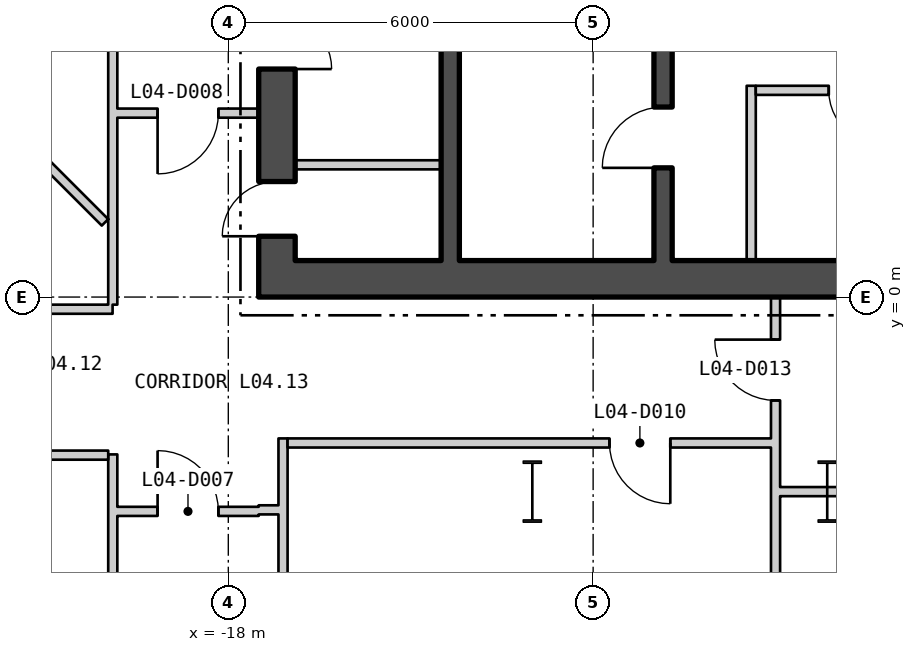
"""IFC4 building model, lengths in metres.
Left out: names, types, materials, properties, quantities, classifications, styles, units other than length and angle.
Written with IfcOpenShell. Run it as: python <this file> out.ifc"""

import sys

from ifc_helpers import new_model, si_unit, direction, frame, frame_2d, origin, origin_2d, place, context, subcontext, project, spatial, rectangle, i_section, extrude, element, fill, save


model = new_model("IFC4")
c1 = context("Model", 3, precision=1e-05, world=origin(), true_north=direction((0.0, 1.0)))
c2 = subcontext(c1, "Body", "Model", "MODEL_VIEW")
j1 = project(units=[si_unit("LENGTHUNIT", "METRE"), si_unit("PLANEANGLEUNIT", "RADIAN")], contexts=[c1])
p1 = place(None, origin())
s1 = spatial("IfcSite", under=j1, at=p1, CompositionType="ELEMENT")
p2 = place(p1, origin())
s2 = spatial("IfcBuilding", under=s1, at=p2, CompositionType="ELEMENT")
p3 = place(p2, frame((0.0, 0.0, 23.7)))
s3 = spatial("IfcBuildingStorey", under=s2, at=p3, CompositionType="ELEMENT", Elevation=23.7)
for number, where, z_axis, x_axis in (
    (1, (-8.15, -3.2, 0.0), (0.0, 0.0, 1.0), (1.0, 0.0, 0.0)),
    (2, (-13.0, -3.2, 0.0), (0.0, 0.0, 1.0), (1.0, 0.0, 0.0)),
):
    element("IfcColumn", number, at=place(p3, frame(where, z_axis=z_axis, x_axis=x_axis)), inside=s3, PredefinedType="COLUMN", context=c2, shape_type="SweptSolid", body=[
        extrude(i_section(OverallWidth=0.302, OverallDepth=1.008, WebThickness=0.021, FlangeThickness=0.04, at=origin_2d()), origin(), (0.0, 0.0, 1.0), 5.1),
    ])
p4 = place(p3, frame((-17.5, 0.3, 0.0), z_axis=(0.0, 0.0, 1.0), x_axis=(1.0, 0.0, 0.0)))
e3 = element("IfcWall", 3, at=p4, inside=s3, PredefinedType="SHEAR", context=c2, shape_type="SweptSolid", body=[
    extrude(rectangle(XDim=35.0, YDim=0.6, at=frame_2d((17.5, 0.0))), origin(), (0.0, 0.0, 1.0), 4.85),
])
p5 = place(p4, frame((12.0, 0.0, 0.0)))
e4 = element("IfcOpeningElement", 4, at=p5, cuts=e3, PredefinedType="OPENING", context=c2, shape_type="SweptSolid", body=[
    extrude(rectangle(XDim=1.8, YDim=2.4, at=frame_2d((0.9, 1.2))), frame((0.0, 0.31, 0.0), z_axis=(0.0, -1.0, 0.0), x_axis=(1.0, 0.0, 0.0)), (0.0, 0.0, 1.0), 0.62),
])
p6 = place(p4, frame((22.0, 0.0, 0.0)))
e5 = element("IfcOpeningElement", 5, at=p6, cuts=e3, PredefinedType="OPENING", context=c2, shape_type="SweptSolid", body=[
    extrude(rectangle(XDim=1.8, YDim=2.4, at=frame_2d((0.9, 1.2))), frame((0.0, 0.31, 0.0), z_axis=(0.0, -1.0, 0.0), x_axis=(1.0, 0.0, 0.0)), (0.0, 0.0, 1.0), 0.62),
])
p7 = place(p3, frame((-17.2, 0.6, 0.0), z_axis=(0.0, 0.0, 1.0), x_axis=(0.0, 1.0, 0.0)))
e6 = element("IfcWall", 6, at=p7, inside=s3, PredefinedType="SHEAR", context=c2, shape_type="SweptSolid", body=[
    extrude(rectangle(XDim=16.8, YDim=0.6, at=frame_2d((8.4, 0.0))), origin(), (0.0, 0.0, 1.0), 4.85),
])
p8 = place(p7, frame((5.7, 0.0, 0.0)))
e7 = element("IfcOpeningElement", 7, at=p8, cuts=e6, PredefinedType="OPENING", context=c2, shape_type="SweptSolid", body=[
    extrude(rectangle(XDim=1.5, YDim=2.1, at=frame_2d((0.75, 1.05))), frame((0.0, 0.31, 0.0), z_axis=(0.0, -1.0, 0.0), x_axis=(1.0, 0.0, 0.0)), (0.0, 0.0, 1.0), 0.62),
])
p9 = place(p7, frame((0.4, 0.0, 0.0)))
e8 = element("IfcOpeningElement", 8, at=p9, cuts=e6, PredefinedType="OPENING", context=c2, shape_type="SweptSolid", body=[
    extrude(rectangle(XDim=0.9, YDim=2.1, at=frame_2d((0.45, 1.05))), frame((0.0, 0.31, 0.0), z_axis=(0.0, -1.0, 0.0), x_axis=(1.0, 0.0, 0.0)), (0.0, 0.0, 1.0), 0.62),
])
p10 = place(p7, frame((3.15, 0.0, 0.0)))
e9 = element("IfcOpeningElement", 9, at=p10, cuts=e6, PredefinedType="OPENING", context=c2, shape_type="SweptSolid", body=[
    extrude(rectangle(XDim=0.9, YDim=2.1, at=frame_2d((0.45, 1.05))), frame((0.0, 0.31, 0.0), z_axis=(0.0, -1.0, 0.0), x_axis=(1.0, 0.0, 0.0)), (0.0, 0.0, 1.0), 0.62),
])
p11 = place(p7, frame((7.816, 0.0, 0.0)))
e10 = element("IfcOpeningElement", 10, at=p11, cuts=e6, PredefinedType="OPENING", context=c2, shape_type="SweptSolid", body=[
    extrude(rectangle(XDim=1.0, YDim=2.1, at=frame_2d((0.5, 1.05))), frame((0.0, 0.31, 0.0), z_axis=(0.0, -1.0, 0.0), x_axis=(1.0, 0.0, 0.0)), (0.0, 0.0, 1.0), 0.62),
])
p12 = place(p7, frame((12.666, 0.0, 0.0)))
e11 = element("IfcOpeningElement", 11, at=p12, cuts=e6, PredefinedType="OPENING", context=c2, shape_type="SweptSolid", body=[
    extrude(rectangle(XDim=0.9, YDim=2.1, at=frame_2d((0.45, 1.05))), frame((0.0, 0.31, 0.0), z_axis=(0.0, -1.0, 0.0), x_axis=(1.0, 0.0, 0.0)), (0.0, 0.0, 1.0), 0.62),
])
p13 = place(p3, frame((-10.85, 0.6, 0.0), z_axis=(0.0, 0.0, 1.0), x_axis=(0.0, 1.0, 0.0)))
e12 = element("IfcWall", 12, at=p13, inside=s3, PredefinedType="SHEAR", context=c2, shape_type="SweptSolid", body=[
    extrude(rectangle(XDim=16.8, YDim=0.3, at=frame_2d((8.4, 0.0))), origin(), (0.0, 0.0, 1.0), 4.85),
])
p14 = place(p13, frame((5.075, 0.0, 0.0)))
e13 = element("IfcOpeningElement", 13, at=p14, cuts=e12, PredefinedType="OPENING", context=c2, shape_type="SweptSolid", body=[
    extrude(rectangle(XDim=1.25, YDim=2.1, at=frame_2d((0.625, 1.05))), frame((0.0, 0.16, 0.0), z_axis=(0.0, -1.0, 0.0), x_axis=(1.0, 0.0, 0.0)), (0.0, 0.0, 1.0), 0.32),
])
p15 = place(p13, frame((1.525, 0.0, 0.0)))
e14 = element("IfcOpeningElement", 14, at=p15, cuts=e12, PredefinedType="OPENING", context=c2, shape_type="SweptSolid", body=[
    extrude(rectangle(XDim=1.0, YDim=2.1, at=frame_2d((0.5, 1.05))), frame((0.0, 0.16, 0.0), z_axis=(0.0, -1.0, 0.0), x_axis=(1.0, 0.0, 0.0)), (0.0, 0.0, 1.0), 0.32),
])
p16 = place(p3, frame((-14.35, 0.6, 0.0), z_axis=(0.0, 0.0, 1.0), x_axis=(0.0, 1.0, 0.0)))
e15 = element("IfcWall", 15, at=p16, inside=s3, PredefinedType="SHEAR", context=c2, shape_type="SweptSolid", body=[
    extrude(rectangle(XDim=16.8, YDim=0.3, at=frame_2d((8.4, 0.0))), origin(), (0.0, 0.0, 1.0), 4.85),
])
p17 = place(p16, frame((5.7, 0.0, 0.0)))
e16 = element("IfcOpeningElement", 16, at=p17, cuts=e15, PredefinedType="OPENING", context=c2, shape_type="SweptSolid", body=[
    extrude(rectangle(XDim=1.5, YDim=2.1, at=frame_2d((0.75, 1.05))), frame((0.0, 0.16, 0.0), z_axis=(0.0, -1.0, 0.0), x_axis=(1.0, 0.0, 0.0)), (0.0, 0.0, 1.0), 0.32),
])
p18 = place(p3, frame((-16.9, 2.175, 0.0), z_axis=(0.0, 0.0, 1.0), x_axis=(1.0, 0.0, 0.0)))
e17 = element("IfcWall", 17, at=p18, inside=s3, PredefinedType="PARTITIONING", context=c2, shape_type="SweptSolid", body=[
    extrude(rectangle(XDim=2.4, YDim=0.15, at=frame_2d((1.2, 0.0))), origin(), (0.0, 0.0, 1.0), 4.85),
])
p19 = place(p3, frame((-9.4, 0.6, 0.0), z_axis=(0.0, 0.0, 1.0), x_axis=(0.0, 1.0, 0.0)))
e18 = element("IfcWall", 18, at=p19, inside=s3, PredefinedType="PARTITIONING", context=c2, shape_type="SweptSolid", body=[
    extrude(rectangle(XDim=2.875, YDim=0.15, at=frame_2d((1.438, 0.0))), origin(), (0.0, 0.0, 1.0), 4.85),
])
p20 = place(p3, frame((-9.325, 3.4, 0.0), z_axis=(0.0, 0.0, 1.0), x_axis=(1.0, 0.0, 0.0)))
e19 = element("IfcWall", 19, at=p20, inside=s3, PredefinedType="PARTITIONING", context=c2, shape_type="SweptSolid", body=[
    extrude(rectangle(XDim=3.3, YDim=0.15, at=frame_2d((1.65, 0.0))), origin(), (0.0, 0.0, 1.0), 4.85),
])
p21 = place(p20, frame((1.2, 0.0, 0.0)))
e20 = element("IfcOpeningElement", 20, at=p21, cuts=e19, PredefinedType="OPENING", context=c2, shape_type="SweptSolid", body=[
    extrude(rectangle(XDim=0.9, YDim=2.1, at=frame_2d((0.45, 1.05))), frame((0.0, 0.085, 0.0), z_axis=(0.0, -1.0, 0.0), x_axis=(1.0, 0.0, 0.0)), (0.0, 0.0, 1.0), 0.17),
])
p22 = place(p3, frame((-26.75, -0.2, 0.0), z_axis=(0.0, 0.0, 1.0), x_axis=(1.0, 0.0, 0.0)))
e21 = element("IfcWall", 21, at=p22, inside=s3, PredefinedType="PARTITIONING", context=c2, shape_type="SweptSolid", body=[
    extrude(rectangle(XDim=6.847, YDim=0.15, at=frame_2d((3.424, 0.0))), origin(), (0.0, 0.0, 1.0), 4.85),
])
p23 = place(p22, frame((3.932, 0.0, 0.0)))
e22 = element("IfcOpeningElement", 22, at=p23, cuts=e21, PredefinedType="OPENING", context=c2, shape_type="SweptSolid", body=[
    extrude(rectangle(XDim=1.0, YDim=2.1, at=frame_2d((0.5, 1.05))), frame((0.0, 0.085, 0.0), z_axis=(0.0, -1.0, 0.0), x_axis=(1.0, 0.0, 0.0)), (0.0, 0.0, 1.0), 0.17),
])
p24 = place(p3, frame((-25.392, 6.592, 0.0), z_axis=(0.0, 0.0, 1.0), x_axis=(0.707106781187, -0.707106781187, 0.0)))
e23 = element("IfcWall", 23, at=p24, inside=s3, PredefinedType="PARTITIONING", context=c2, shape_type="SweptSolid", body=[
    extrude(rectangle(XDim=7.586, YDim=0.15, at=frame_2d((3.793, 0.0))), origin(), (0.0, 0.0, 1.0), 4.85),
])
p25 = place(p3, frame((-23.65, -2.6, 0.0), z_axis=(0.0, 0.0, 1.0), x_axis=(1.0, 0.0, 0.0)))
e24 = element("IfcWall", 24, at=p25, inside=s3, PredefinedType="PARTITIONING", context=c2, shape_type="SweptSolid", body=[
    extrude(rectangle(XDim=3.675, YDim=0.15, at=frame_2d((1.837, 0.0))), origin(), (0.0, 0.0, 1.0), 4.85),
])
p26 = place(p25, frame((1.312, 0.0, 0.0)))
e25 = element("IfcOpeningElement", 25, at=p26, cuts=e24, PredefinedType="OPENING", context=c2, shape_type="SweptSolid", body=[
    extrude(rectangle(XDim=1.0, YDim=2.1, at=frame_2d((0.5, 1.05))), frame((0.0, 0.085, 0.0), z_axis=(0.0, -1.0, 0.0), x_axis=(1.0, 0.0, 0.0)), (0.0, 0.0, 1.0), 0.17),
])
p27 = place(p3, frame((-19.9, -23.775, 0.0), z_axis=(0.0, 0.0, 1.0), x_axis=(0.0, 1.0, 0.0)))
e26 = element("IfcWall", 26, at=p27, inside=s3, PredefinedType="PARTITIONING", context=c2, shape_type="SweptSolid", body=[
    extrude(rectangle(XDim=21.187, YDim=0.15, at=frame_2d((10.594, 0.0))), origin(), (0.0, 0.0, 1.0), 4.85),
])
p28 = place(p27, frame((3.548, 0.0, 0.0)))
e27 = element("IfcOpeningElement", 27, at=p28, cuts=e26, PredefinedType="OPENING", context=c2, shape_type="SweptSolid", body=[
    extrude(rectangle(XDim=1.8, YDim=2.1, at=frame_2d((0.9, 1.05))), frame((0.0, 0.085, 0.0), z_axis=(0.0, -1.0, 0.0), x_axis=(1.0, 0.0, 0.0)), (0.0, 0.0, 1.0), 0.17),
])
p29 = place(p27, frame((12.399, 0.0, 0.0)))
e28 = element("IfcOpeningElement", 28, at=p29, cuts=e26, PredefinedType="OPENING", context=c2, shape_type="SweptSolid", body=[
    extrude(rectangle(XDim=1.0, YDim=2.1, at=frame_2d((0.5, 1.05))), frame((0.0, 0.085, 0.0), z_axis=(0.0, -1.0, 0.0), x_axis=(1.0, 0.0, 0.0)), (0.0, 0.0, 1.0), 0.17),
])
p30 = place(p3, frame((-19.9, -0.125, 0.0), z_axis=(0.0, 0.0, 1.0), x_axis=(0.0, 1.0, 0.0)))
e29 = element("IfcWall", 29, at=p30, inside=s3, PredefinedType="PARTITIONING", context=c2, shape_type="SweptSolid", body=[
    extrude(rectangle(XDim=1.15, YDim=0.15, at=frame_2d((0.575, 0.0))), origin(), (0.0, 0.0, 1.0), 4.85),
])
p31 = place(p3, frame((-19.9, 1.025, 0.0), z_axis=(0.0, 0.0, 1.0), x_axis=(0.0, 1.0, 0.0)))
e30 = element("IfcWall", 30, at=p31, inside=s3, PredefinedType="PARTITIONING", context=c2, shape_type="SweptSolid", body=[
    extrude(rectangle(XDim=16.9, YDim=0.15, at=frame_2d((8.45, 0.0))), origin(), (0.0, 0.0, 1.0), 4.85),
])
p32 = place(p31, frame((8.244, 0.0, 0.0)))
e31 = element("IfcOpeningElement", 31, at=p32, cuts=e30, PredefinedType="OPENING", context=c2, shape_type="SweptSolid", body=[
    extrude(rectangle(XDim=1.8, YDim=2.1, at=frame_2d((0.9, 1.05))), frame((0.0, 0.085, 0.0), z_axis=(0.0, -1.0, 0.0), x_axis=(1.0, 0.0, 0.0)), (0.0, 0.0, 1.0), 0.17),
])
p33 = place(p3, frame((-19.825, -3.525, 0.0), z_axis=(0.0, 0.0, 1.0), x_axis=(1.0, 0.0, 0.0)))
e32 = element("IfcWall", 32, at=p33, inside=s3, PredefinedType="PARTITIONING", context=c2, shape_type="SweptSolid", body=[
    extrude(rectangle(XDim=2.325, YDim=0.15, at=frame_2d((1.163, 0.0))), origin(), (0.0, 0.0, 1.0), 4.85),
])
p34 = place(p33, frame((0.662, 0.0, 0.0)))
e33 = element("IfcOpeningElement", 33, at=p34, cuts=e32, PredefinedType="OPENING", context=c2, shape_type="SweptSolid", body=[
    extrude(rectangle(XDim=1.0, YDim=2.1, at=frame_2d((0.5, 1.05))), frame((0.0, 0.085, 0.0), z_axis=(0.0, -1.0, 0.0), x_axis=(1.0, 0.0, 0.0)), (0.0, 0.0, 1.0), 0.17),
])
p35 = place(p3, frame((-19.825, 3.025, 0.0), z_axis=(0.0, 0.0, 1.0), x_axis=(1.0, 0.0, 0.0)))
e34 = element("IfcWall", 34, at=p35, inside=s3, PredefinedType="PARTITIONING", context=c2, shape_type="SweptSolid", body=[
    extrude(rectangle(XDim=2.325, YDim=0.15, at=frame_2d((1.163, 0.0))), origin(), (0.0, 0.0, 1.0), 4.3),
])
p36 = place(p35, frame((0.662, 0.0, 0.0)))
e35 = element("IfcOpeningElement", 35, at=p36, cuts=e34, PredefinedType="OPENING", context=c2, shape_type="SweptSolid", body=[
    extrude(rectangle(XDim=1.0, YDim=2.1, at=frame_2d((0.5, 1.05))), frame((0.0, 0.085, 0.0), z_axis=(0.0, -1.0, 0.0), x_axis=(1.0, 0.0, 0.0)), (0.0, 0.0, 1.0), 0.17),
])
p37 = place(p3, frame((-17.5, -3.5, 0.0), z_axis=(0.0, 0.0, 1.0), x_axis=(1.0, 0.0, 0.0)))
e36 = element("IfcWall", 36, at=p37, inside=s3, PredefinedType="PARTITIONING", context=c2, shape_type="SweptSolid", body=[
    extrude(rectangle(XDim=0.325, YDim=0.15, at=frame_2d((0.163, 0.0))), origin(), (0.0, 0.0, 1.0), 4.85),
])
p38 = place(p3, frame((-17.1, -21.375, 0.0), z_axis=(0.0, 0.0, 1.0), x_axis=(0.0, 1.0, 0.0)))
e37 = element("IfcWall", 37, at=p38, inside=s3, PredefinedType="PARTITIONING", context=c2, shape_type="SweptSolid", body=[
    extrude(rectangle(XDim=19.05, YDim=0.15, at=frame_2d((9.525, 0.0))), origin(), (0.0, 0.0, 1.0), 4.85),
])
p39 = place(p3, frame((-17.025, -2.4, 0.0), z_axis=(0.0, 0.0, 1.0), x_axis=(1.0, 0.0, 0.0)))
e38 = element("IfcWall", 38, at=p39, inside=s3, PredefinedType="PARTITIONING", context=c2, shape_type="SweptSolid", body=[
    extrude(rectangle(XDim=7.95, YDim=0.15, at=frame_2d((3.975, 0.0))), origin(), (0.0, 0.0, 1.0), 4.85),
])
p40 = place(p39, frame((5.294, 0.0, 0.0)))
e39 = element("IfcOpeningElement", 39, at=p40, cuts=e38, PredefinedType="OPENING", context=c2, shape_type="SweptSolid", body=[
    extrude(rectangle(XDim=1.0, YDim=2.1, at=frame_2d((0.5, 1.05))), frame((0.0, 0.085, 0.0), z_axis=(0.0, -1.0, 0.0), x_axis=(1.0, 0.0, 0.0)), (0.0, 0.0, 1.0), 0.17),
])
p41 = place(p3, frame((-9.0, -13.675, 0.0), z_axis=(0.0, 0.0, 1.0), x_axis=(0.0, 1.0, 0.0)))
e40 = element("IfcWall", 40, at=p41, inside=s3, PredefinedType="PARTITIONING", context=c2, shape_type="SweptSolid", body=[
    extrude(rectangle(XDim=13.675, YDim=0.15, at=frame_2d((6.838, 0.0))), origin(), (0.0, 0.0, 1.0), 4.85),
])
p42 = place(p41, frame((11.975, 0.0, 0.0)))
e41 = element("IfcOpeningElement", 41, at=p42, cuts=e40, PredefinedType="OPENING", context=c2, shape_type="SweptSolid", body=[
    extrude(rectangle(XDim=1.0, YDim=2.1, at=frame_2d((0.5, 1.05))), frame((0.0, 0.085, 0.0), z_axis=(0.0, -1.0, 0.0), x_axis=(1.0, 0.0, 0.0)), (0.0, 0.0, 1.0), 0.17),
])
p43 = place(p3, frame((-8.925, -3.2, 0.0), z_axis=(0.0, 0.0, 1.0), x_axis=(1.0, 0.0, 0.0)))
e42 = element("IfcWall", 42, at=p43, inside=s3, PredefinedType="PARTITIONING", context=c2, shape_type="SweptSolid", body=[
    extrude(rectangle(XDim=0.775, YDim=0.15, at=frame_2d((0.388, 0.0))), origin(), (0.0, 0.0, 1.0), 4.16),
])
p44 = place(p3, frame((-8.15, -3.2, 0.0), z_axis=(0.0, 0.0, 1.0), x_axis=(1.0, 0.0, 0.0)))
e43 = element("IfcWall", 43, at=p44, inside=s3, PredefinedType="PARTITIONING", context=c2, shape_type="SweptSolid", body=[
    extrude(rectangle(XDim=2.225, YDim=0.15, at=frame_2d((1.113, 0.0))), origin(), (0.0, 0.0, 1.0), 3.94),
])
p45 = place(p44, frame((0.513, 0.0, 0.0)))
e44 = element("IfcOpeningElement", 44, at=p45, cuts=e43, PredefinedType="OPENING", context=c2, shape_type="SweptSolid", body=[
    extrude(rectangle(XDim=1.0, YDim=2.1, at=frame_2d((0.5, 1.05))), frame((0.0, 0.085, 0.0), z_axis=(0.0, -1.0, 0.0), x_axis=(1.0, 0.0, 0.0)), (0.0, 0.0, 1.0), 0.17),
])
p46 = place(p15, origin())
e45 = element("IfcDoor", 45, at=p46, inside=s3, OperationType="SINGLE_SWING_RIGHT", PredefinedType="DOOR", context=c2, shape_type="SweptSolid", body=[
    extrude(rectangle(XDim=1.0, YDim=2.1, at=frame_2d((0.5, 1.05))), frame((0.0, 0.025, 0.0), z_axis=(0.0, -1.0, 0.0), x_axis=(1.0, 0.0, 0.0)), (0.0, 0.0, 1.0), 0.05),
])
fill(e14, e45)
p47 = place(p9, origin())
e46 = element("IfcDoor", 46, at=p47, inside=s3, OperationType="SINGLE_SWING_RIGHT", PredefinedType="DOOR", context=c2, shape_type="SweptSolid", body=[
    extrude(rectangle(XDim=0.9, YDim=2.1, at=frame_2d((0.45, 1.05))), frame((0.0, 0.025, 0.0), z_axis=(0.0, -1.0, 0.0), x_axis=(1.0, 0.0, 0.0)), (0.0, 0.0, 1.0), 0.05),
])
fill(e8, e46)
p48 = place(p10, origin())
e47 = element("IfcDoor", 47, at=p48, inside=s3, OperationType="SINGLE_SWING_LEFT", PredefinedType="DOOR", context=c2, shape_type="SweptSolid", body=[
    extrude(rectangle(XDim=0.9, YDim=2.1, at=frame_2d((0.45, 1.05))), frame((0.0, 0.025, 0.0), z_axis=(0.0, -1.0, 0.0), x_axis=(1.0, 0.0, 0.0)), (0.0, 0.0, 1.0), 0.05),
])
fill(e9, e47)
p49 = place(p21, origin())
e48 = element("IfcDoor", 48, at=p49, inside=s3, OperationType="SINGLE_SWING_RIGHT", PredefinedType="DOOR", context=c2, shape_type="SweptSolid", body=[
    extrude(rectangle(XDim=0.9, YDim=2.1, at=frame_2d((0.45, 1.05))), frame((0.0, 0.025, 0.0), z_axis=(0.0, -1.0, 0.0), x_axis=(1.0, 0.0, 0.0)), (0.0, 0.0, 1.0), 0.05),
])
fill(e20, e48)
p50 = place(p34, origin())
e49 = element("IfcDoor", 49, at=p50, inside=s3, OperationType="SINGLE_SWING_RIGHT", PredefinedType="DOOR", context=c2, shape_type="SweptSolid", body=[
    extrude(rectangle(XDim=1.0, YDim=2.1, at=frame_2d((0.5, 1.05))), frame((0.0, 0.025, 0.0), z_axis=(0.0, -1.0, 0.0), x_axis=(1.0, 0.0, 0.0)), (0.0, 0.0, 1.0), 0.05),
])
fill(e33, e49)
p51 = place(p36, origin())
e50 = element("IfcDoor", 50, at=p51, inside=s3, OperationType="SINGLE_SWING_LEFT", PredefinedType="DOOR", context=c2, shape_type="SweptSolid", body=[
    extrude(rectangle(XDim=1.0, YDim=2.1, at=frame_2d((0.5, 1.05))), frame((0.0, 0.025, 0.0), z_axis=(0.0, -1.0, 0.0), x_axis=(1.0, 0.0, 0.0)), (0.0, 0.0, 1.0), 0.05),
])
fill(e35, e50)
p52 = place(p40, origin())
e51 = element("IfcDoor", 51, at=p52, inside=s3, OperationType="SINGLE_SWING_RIGHT", PredefinedType="DOOR", context=c2, shape_type="SweptSolid", body=[
    extrude(rectangle(XDim=1.0, YDim=2.1, at=frame_2d((0.5, 1.05))), frame((0.0, 0.025, 0.0), z_axis=(0.0, -1.0, 0.0), x_axis=(1.0, 0.0, 0.0)), (0.0, 0.0, 1.0), 0.05),
])
fill(e39, e51)
p53 = place(p42, origin())
e52 = element("IfcDoor", 52, at=p53, inside=s3, OperationType="SINGLE_SWING_LEFT", PredefinedType="DOOR", context=c2, shape_type="SweptSolid", body=[
    extrude(rectangle(XDim=1.0, YDim=2.1, at=frame_2d((0.5, 1.05))), frame((0.0, 0.025, 0.0), z_axis=(0.0, -1.0, 0.0), x_axis=(1.0, 0.0, 0.0)), (0.0, 0.0, 1.0), 0.05),
])
fill(e41, e52)
save(model, sys.argv[1])
